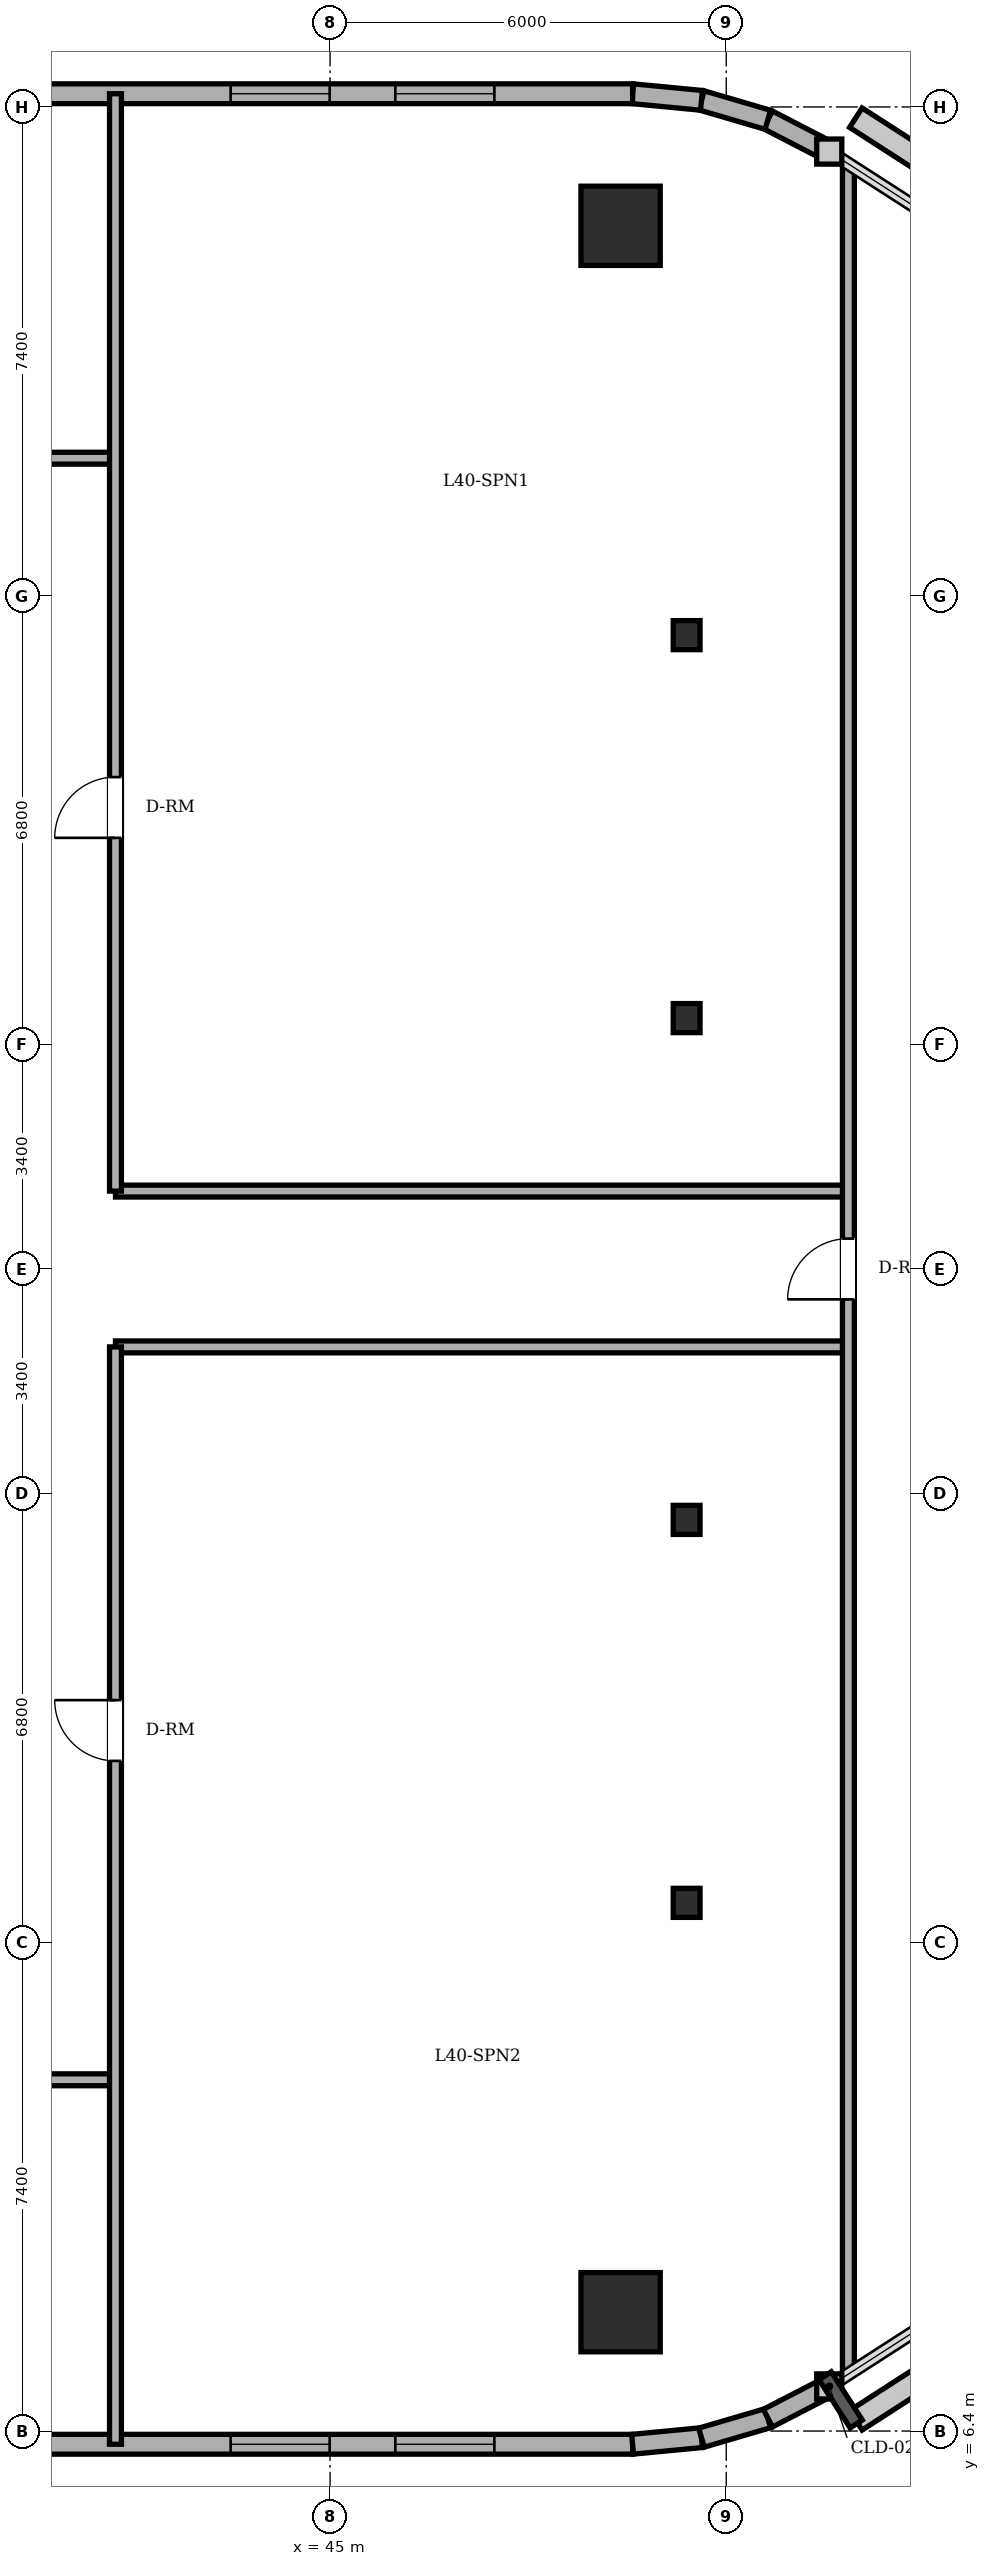
"""IFC4 building model, lengths in metres.
Left out: names, types, materials, properties, quantities, classifications, styles, units other than length and angle.
Written with IfcOpenShell. Run it as: python <this file> out.ifc"""

import sys

from ifc_helpers import new_model, si_unit, direction, frame, frame_2d, origin, origin_2d, place, context, subcontext, project, spatial, rectangle, circle, i_section, extrude, element, fill, save


model = new_model("IFC4")
c1 = context("Model", 3, precision=1e-05, world=origin(), true_north=direction((0.0, 1.0)))
c2 = subcontext(c1, "Body", "Model", "MODEL_VIEW")
j1 = project(units=[si_unit("LENGTHUNIT", "METRE"), si_unit("PLANEANGLEUNIT", "RADIAN")], contexts=[c1])
p1 = place(None, origin())
s1 = spatial("IfcSite", under=j1, at=p1, CompositionType="ELEMENT")
p2 = place(p1, origin())
s2 = spatial("IfcBuilding", under=s1, at=p2, CompositionType="ELEMENT")
p3 = place(p2, frame((0.0, 0.0, 154.6)))
s3 = spatial("IfcBuildingStorey", under=s2, at=p3, CompositionType="ELEMENT", Elevation=154.6)
for number, where, z_axis, x_axis in (
    (1, (49.4, 8.2, 0.0), (0.0, 0.0, 1.0), (1.0, 0.0, 0.0)),
    (2, (49.4, 39.8, 0.0), (0.0, 0.0, 1.0), (1.0, 0.0, 0.0)),
):
    element("IfcColumn", number, at=place(p3, frame(where, z_axis=z_axis, x_axis=x_axis)), inside=s3, PredefinedType="COLUMN", context=c2, shape_type="SweptSolid", body=[
        extrude(circle(Radius=0.6, at=origin_2d()), origin(), (0.0, 0.0, 1.0), 3.6),
    ])
for number, where, z_axis, x_axis in (
    (3, (50.4, 14.4, 0.0), (0.0, 0.0, 1.0), (1.0, 0.0, 0.0)),
    (4, (50.4, 20.2, 0.0), (0.0, 0.0, 1.0), (1.0, 0.0, 0.0)),
    (5, (50.4, 27.8, 0.0), (0.0, 0.0, 1.0), (1.0, 0.0, 0.0)),
    (6, (50.4, 33.6, 0.0), (0.0, 0.0, 1.0), (1.0, 0.0, 0.0)),
):
    element("IfcColumn", number, at=place(p3, frame(where, z_axis=z_axis, x_axis=x_axis)), inside=s3, PredefinedType="COLUMN", context=c2, shape_type="SweptSolid", body=[
        extrude(i_section(OverallWidth=0.406, OverallDepth=0.44, WebThickness=0.024, FlangeThickness=0.039, FilletRadius=0.015, at=origin_2d()), origin(), (0.0, 0.0, 1.0), 3.6),
    ])
p4 = place(p3, frame((19.3, 6.2, 0.0), z_axis=(0.0, 0.0, 1.0), x_axis=(1.0, 0.0, 0.0)))
e7 = element("IfcWall", 7, at=p4, inside=s3, PredefinedType="SOLIDWALL", context=c2, shape_type="SweptSolid", body=[
    extrude(rectangle(XDim=30.282, YDim=0.3, at=frame_2d((15.141, 0.0))), origin(), (0.0, 0.0, 1.0), 3.4),
])
p5 = place(p4, frame((5.825, 0.0, 0.0)))
e8 = element("IfcOpeningElement", 8, at=p5, cuts=e7, PredefinedType="OPENING", context=c2, shape_type="SweptSolid", body=[
    extrude(rectangle(XDim=0.95, YDim=2.2, at=frame_2d((0.475, 1.1))), frame((0.0, 0.16, 0.0), z_axis=(0.0, -1.0, 0.0), x_axis=(1.0, 0.0, 0.0)), (0.0, 0.0, 1.0), 0.32),
])
p6 = place(p4, frame((1.25, 0.0, 0.85)))
e9 = element("IfcOpeningElement", 9, at=p6, cuts=e7, PredefinedType="OPENING", context=c2, shape_type="SweptSolid", body=[
    extrude(rectangle(XDim=1.5, YDim=1.55, at=frame_2d((0.75, 0.775))), frame((0.0, 0.16, 0.0), z_axis=(0.0, -1.0, 0.0), x_axis=(1.0, 0.0, 0.0)), (0.0, 0.0, 1.0), 0.32),
])
p7 = place(p4, frame((2.9, 0.0, 0.85)))
e10 = element("IfcOpeningElement", 10, at=p7, cuts=e7, PredefinedType="OPENING", context=c2, shape_type="SweptSolid", body=[
    extrude(rectangle(XDim=1.5, YDim=1.55, at=frame_2d((0.75, 0.775))), frame((0.0, 0.16, 0.0), z_axis=(0.0, -1.0, 0.0), x_axis=(1.0, 0.0, 0.0)), (0.0, 0.0, 1.0), 0.32),
])
p8 = place(p4, frame((12.8, 0.0, 0.85)))
e11 = element("IfcOpeningElement", 11, at=p8, cuts=e7, PredefinedType="OPENING", context=c2, shape_type="SweptSolid", body=[
    extrude(rectangle(XDim=1.5, YDim=1.55, at=frame_2d((0.75, 0.775))), frame((0.0, 0.16, 0.0), z_axis=(0.0, -1.0, 0.0), x_axis=(1.0, 0.0, 0.0)), (0.0, 0.0, 1.0), 0.32),
])
p9 = place(p4, frame((17.25, 0.0, 0.85)))
e12 = element("IfcOpeningElement", 12, at=p9, cuts=e7, PredefinedType="OPENING", context=c2, shape_type="SweptSolid", body=[
    extrude(rectangle(XDim=1.5, YDim=1.55, at=frame_2d((0.75, 0.775))), frame((0.0, 0.16, 0.0), z_axis=(0.0, -1.0, 0.0), x_axis=(1.0, 0.0, 0.0)), (0.0, 0.0, 1.0), 0.32),
])
p10 = place(p4, frame((24.194, 0.0, 0.85)))
e13 = element("IfcOpeningElement", 13, at=p10, cuts=e7, PredefinedType="OPENING", context=c2, shape_type="SweptSolid", body=[
    extrude(rectangle(XDim=1.5, YDim=1.55, at=frame_2d((0.75, 0.775))), frame((0.0, 0.16, 0.0), z_axis=(0.0, -1.0, 0.0), x_axis=(1.0, 0.0, 0.0)), (0.0, 0.0, 1.0), 0.32),
])
p11 = place(p4, frame((26.688, 0.0, 0.85)))
e14 = element("IfcOpeningElement", 14, at=p11, cuts=e7, PredefinedType="OPENING", context=c2, shape_type="SweptSolid", body=[
    extrude(rectangle(XDim=1.5, YDim=1.55, at=frame_2d((0.75, 0.775))), frame((0.0, 0.16, 0.0), z_axis=(0.0, -1.0, 0.0), x_axis=(1.0, 0.0, 0.0)), (0.0, 0.0, 1.0), 0.32),
])
p12 = place(p3, frame((49.582, 6.2, 0.0), z_axis=(0.0, 0.0, 1.0), x_axis=(0.995426089968, 0.095534807324, 0.0)))
e15 = element("IfcWall", 15, at=p12, inside=s3, PredefinedType="SOLIDWALL", context=c2, shape_type="SweptSolid", body=[
    extrude(rectangle(XDim=1.048, YDim=0.3, at=frame_2d((0.524, 0.0))), origin(), (0.0, 0.0, 1.0), 3.4),
])
p13 = place(p3, frame((50.625, 6.3, 0.0), z_axis=(0.0, 0.0, 1.0), x_axis=(0.959528674476, 0.281610942363, 0.0)))
e16 = element("IfcWall", 16, at=p13, inside=s3, PredefinedType="SOLIDWALL", context=c2, shape_type="SweptSolid", body=[
    extrude(rectangle(XDim=1.047, YDim=0.3, at=frame_2d((0.524, 0.0))), origin(), (0.0, 0.0, 1.0), 3.4),
])
for number, where, z_axis, x_axis in (
    (17, (51.63, 6.595, 0.0), (0.0, 0.0, 1.0), (0.888, 0.459, 0.0)),
    (18, (52.56, 40.924, 0.0), (0.0, 0.0, 1.0), (-0.888, 0.459, 0.0)),
):
    element("IfcWall", number, at=place(p3, frame(where, z_axis=z_axis, x_axis=x_axis)), inside=s3, PredefinedType="SOLIDWALL", context=c2, shape_type="SweptSolid", body=[
        extrude(rectangle(XDim=1.047, YDim=0.3, at=frame_2d((0.523, 0.0))), origin(), (0.0, 0.0, 1.0), 3.4),
    ])
p14 = place(p3, frame((51.63, 41.405, 0.0), z_axis=(0.0, 0.0, 1.0), x_axis=(-0.959528674476, 0.281610942363, 0.0)))
e19 = element("IfcWall", 19, at=p14, inside=s3, PredefinedType="SOLIDWALL", context=c2, shape_type="SweptSolid", body=[
    extrude(rectangle(XDim=1.047, YDim=0.3, at=frame_2d((0.524, 0.0))), origin(), (0.0, 0.0, 1.0), 3.4),
])
p15 = place(p3, frame((50.625, 41.7, 0.0), z_axis=(0.0, 0.0, 1.0), x_axis=(-0.995426089968, 0.095534807324, 0.0)))
e20 = element("IfcWall", 20, at=p15, inside=s3, PredefinedType="SOLIDWALL", context=c2, shape_type="SweptSolid", body=[
    extrude(rectangle(XDim=1.048, YDim=0.3, at=frame_2d((0.524, 0.0))), origin(), (0.0, 0.0, 1.0), 3.4),
])
p16 = place(p3, frame((49.582, 41.8, 0.0), z_axis=(0.0, 0.0, 1.0), x_axis=(-1.0, 0.0, 0.0)))
e21 = element("IfcWall", 21, at=p16, inside=s3, PredefinedType="SOLIDWALL", context=c2, shape_type="SweptSolid", body=[
    extrude(rectangle(XDim=30.282, YDim=0.3, at=frame_2d((15.141, 0.0))), origin(), (0.0, 0.0, 1.0), 3.4),
])
p17 = place(p16, frame((13.907, 0.0, 0.0)))
e22 = element("IfcOpeningElement", 22, at=p17, cuts=e21, PredefinedType="OPENING", context=c2, shape_type="SweptSolid", body=[
    extrude(rectangle(XDim=0.95, YDim=2.2, at=frame_2d((0.475, 1.1))), frame((0.0, 0.16, 0.0), z_axis=(0.0, -1.0, 0.0), x_axis=(1.0, 0.0, 0.0)), (0.0, 0.0, 1.0), 0.32),
])
p18 = place(p16, frame((2.094, 0.0, 0.85)))
e23 = element("IfcOpeningElement", 23, at=p18, cuts=e21, PredefinedType="OPENING", context=c2, shape_type="SweptSolid", body=[
    extrude(rectangle(XDim=1.5, YDim=1.55, at=frame_2d((0.75, 0.775))), frame((0.0, 0.16, 0.0), z_axis=(0.0, -1.0, 0.0), x_axis=(1.0, 0.0, 0.0)), (0.0, 0.0, 1.0), 0.32),
])
p19 = place(p16, frame((4.588, 0.0, 0.85)))
e24 = element("IfcOpeningElement", 24, at=p19, cuts=e21, PredefinedType="OPENING", context=c2, shape_type="SweptSolid", body=[
    extrude(rectangle(XDim=1.5, YDim=1.55, at=frame_2d((0.75, 0.775))), frame((0.0, 0.16, 0.0), z_axis=(0.0, -1.0, 0.0), x_axis=(1.0, 0.0, 0.0)), (0.0, 0.0, 1.0), 0.32),
])
p20 = place(p16, frame((10.399, 0.0, 0.85)))
e25 = element("IfcOpeningElement", 25, at=p20, cuts=e21, PredefinedType="OPENING", context=c2, shape_type="SweptSolid", body=[
    extrude(rectangle(XDim=1.5, YDim=1.55, at=frame_2d((0.75, 0.775))), frame((0.0, 0.16, 0.0), z_axis=(0.0, -1.0, 0.0), x_axis=(1.0, 0.0, 0.0)), (0.0, 0.0, 1.0), 0.32),
])
p21 = place(p16, frame((18.932, 0.0, 0.85)))
e26 = element("IfcOpeningElement", 26, at=p21, cuts=e21, PredefinedType="OPENING", context=c2, shape_type="SweptSolid", body=[
    extrude(rectangle(XDim=1.5, YDim=1.55, at=frame_2d((0.75, 0.775))), frame((0.0, 0.16, 0.0), z_axis=(0.0, -1.0, 0.0), x_axis=(1.0, 0.0, 0.0)), (0.0, 0.0, 1.0), 0.32),
])
p22 = place(p16, frame((22.532, 0.0, 0.85)))
e27 = element("IfcOpeningElement", 27, at=p22, cuts=e21, PredefinedType="OPENING", context=c2, shape_type="SweptSolid", body=[
    extrude(rectangle(XDim=1.5, YDim=1.55, at=frame_2d((0.75, 0.775))), frame((0.0, 0.16, 0.0), z_axis=(0.0, -1.0, 0.0), x_axis=(1.0, 0.0, 0.0)), (0.0, 0.0, 1.0), 0.32),
])
p23 = place(p16, frame((25.882, 0.0, 0.85)))
e28 = element("IfcOpeningElement", 28, at=p23, cuts=e21, PredefinedType="OPENING", context=c2, shape_type="SweptSolid", body=[
    extrude(rectangle(XDim=1.5, YDim=1.55, at=frame_2d((0.75, 0.775))), frame((0.0, 0.16, 0.0), z_axis=(0.0, -1.0, 0.0), x_axis=(1.0, 0.0, 0.0)), (0.0, 0.0, 1.0), 0.32),
])
p24 = place(p16, frame((27.532, 0.0, 0.85)))
e29 = element("IfcOpeningElement", 29, at=p24, cuts=e21, PredefinedType="OPENING", context=c2, shape_type="SweptSolid", body=[
    extrude(rectangle(XDim=1.5, YDim=1.55, at=frame_2d((0.75, 0.775))), frame((0.0, 0.16, 0.0), z_axis=(0.0, -1.0, 0.0), x_axis=(1.0, 0.0, 0.0)), (0.0, 0.0, 1.0), 0.32),
])
p25 = place(p3, frame((13.8, 11.72, 0.0), z_axis=(0.0, 0.0, 1.0), x_axis=(1.0, 0.0, 0.0)))
e30 = element("IfcWall", 30, at=p25, inside=s3, PredefinedType="PARTITIONING", context=c2, shape_type="SweptSolid", body=[
    extrude(rectangle(XDim=27.95, YDim=0.18, at=frame_2d((13.975, 0.0))), origin(), (0.0, 0.0, 1.0), 3.4),
])
p26 = place(p25, frame((12.24, 0.0, 0.0)))
e31 = element("IfcOpeningElement", 31, at=p26, cuts=e30, PredefinedType="OPENING", context=c2, shape_type="SweptSolid", body=[
    extrude(rectangle(XDim=0.92, YDim=2.1, at=frame_2d((0.46, 1.05))), frame((0.0, 0.1, 0.0), z_axis=(0.0, -1.0, 0.0), x_axis=(1.0, 0.0, 0.0)), (0.0, 0.0, 1.0), 0.2),
])
p27 = place(p25, frame((5.54, 0.0, 0.0)))
e32 = element("IfcOpeningElement", 32, at=p27, cuts=e30, PredefinedType="OPENING", context=c2, shape_type="SweptSolid", body=[
    extrude(rectangle(XDim=0.92, YDim=2.1, at=frame_2d((0.46, 1.05))), frame((0.0, 0.1, 0.0), z_axis=(0.0, -1.0, 0.0), x_axis=(1.0, 0.0, 0.0)), (0.0, 0.0, 1.0), 0.2),
])
p28 = place(p25, frame((20.555, 0.0, 0.0)))
e33 = element("IfcOpeningElement", 33, at=p28, cuts=e30, PredefinedType="OPENING", context=c2, shape_type="SweptSolid", body=[
    extrude(rectangle(XDim=0.92, YDim=2.1, at=frame_2d((0.46, 1.05))), frame((0.0, 0.1, 0.0), z_axis=(0.0, -1.0, 0.0), x_axis=(1.0, 0.0, 0.0)), (0.0, 0.0, 1.0), 0.2),
])
for number, where, z_axis, x_axis in (
    (34, (41.75, 22.82, 0.0), (0.0, 0.0, 1.0), (1.0, 0.0, 0.0)),
    (35, (41.75, 25.18, 0.0), (0.0, 0.0, 1.0), (1.0, 0.0, 0.0)),
):
    element("IfcWall", number, at=place(p3, frame(where, z_axis=z_axis, x_axis=x_axis)), inside=s3, PredefinedType="PARTITIONING", context=c2, shape_type="SweptSolid", body=[
        extrude(rectangle(XDim=11.1, YDim=0.18, at=frame_2d((5.55, 0.0))), origin(), (0.0, 0.0, 1.0), 3.4),
    ])
p29 = place(p3, frame((13.8, 36.28, 0.0), z_axis=(0.0, 0.0, 1.0), x_axis=(1.0, 0.0, 0.0)))
e36 = element("IfcWall", 36, at=p29, inside=s3, PredefinedType="PARTITIONING", context=c2, shape_type="SweptSolid", body=[
    extrude(rectangle(XDim=27.95, YDim=0.18, at=frame_2d((13.975, 0.0))), origin(), (0.0, 0.0, 1.0), 3.4),
])
p30 = place(p29, frame((12.05, 0.0, 0.0)))
e37 = element("IfcOpeningElement", 37, at=p30, cuts=e36, PredefinedType="OPENING", context=c2, shape_type="SweptSolid", body=[
    extrude(rectangle(XDim=0.9, YDim=2.1, at=frame_2d((0.45, 1.05))), frame((0.0, 0.1, 0.0), z_axis=(0.0, -1.0, 0.0), x_axis=(1.0, 0.0, 0.0)), (0.0, 0.0, 1.0), 0.2),
])
p31 = place(p29, frame((15.67, 0.0, 0.0)))
e38 = element("IfcOpeningElement", 38, at=p31, cuts=e36, PredefinedType="OPENING", context=c2, shape_type="SweptSolid", body=[
    extrude(rectangle(XDim=0.86, YDim=2.1, at=frame_2d((0.43, 1.05))), frame((0.0, 0.1, 0.0), z_axis=(0.0, -1.0, 0.0), x_axis=(1.0, 0.0, 0.0)), (0.0, 0.0, 1.0), 0.2),
])
p32 = place(p29, frame((5.54, 0.0, 0.0)))
e39 = element("IfcOpeningElement", 39, at=p32, cuts=e36, PredefinedType="OPENING", context=c2, shape_type="SweptSolid", body=[
    extrude(rectangle(XDim=0.92, YDim=2.1, at=frame_2d((0.46, 1.05))), frame((0.0, 0.1, 0.0), z_axis=(0.0, -1.0, 0.0), x_axis=(1.0, 0.0, 0.0)), (0.0, 0.0, 1.0), 0.2),
])
p33 = place(p29, frame((22.215, 0.0, 0.0)))
e40 = element("IfcOpeningElement", 40, at=p33, cuts=e36, PredefinedType="OPENING", context=c2, shape_type="SweptSolid", body=[
    extrude(rectangle(XDim=1.0, YDim=2.15, at=frame_2d((0.5, 1.075))), frame((0.0, 0.1, 0.0), z_axis=(0.0, -1.0, 0.0), x_axis=(1.0, 0.0, 0.0)), (0.0, 0.0, 1.0), 0.2),
])
p34 = place(p3, frame((41.75, 6.2, 0.0), z_axis=(0.0, 0.0, 1.0), x_axis=(0.0, 1.0, 0.0)))
e41 = element("IfcWall", 41, at=p34, inside=s3, PredefinedType="PARTITIONING", context=c2, shape_type="SweptSolid", body=[
    extrude(rectangle(XDim=16.62, YDim=0.18, at=frame_2d((8.31, 0.0))), origin(), (0.0, 0.0, 1.0), 3.4),
])
p35 = place(p34, frame((10.35, 0.0, 0.0)))
e42 = element("IfcOpeningElement", 42, at=p35, cuts=e41, PredefinedType="OPENING", context=c2, shape_type="SweptSolid", body=[
    extrude(rectangle(XDim=0.92, YDim=2.1, at=frame_2d((0.46, 1.05))), frame((0.0, 0.1, 0.0), z_axis=(0.0, -1.0, 0.0), x_axis=(1.0, 0.0, 0.0)), (0.0, 0.0, 1.0), 0.2),
])
p36 = place(p3, frame((41.75, 25.18, 0.0), z_axis=(0.0, 0.0, 1.0), x_axis=(0.0, 1.0, 0.0)))
e43 = element("IfcWall", 43, at=p36, inside=s3, PredefinedType="PARTITIONING", context=c2, shape_type="SweptSolid", body=[
    extrude(rectangle(XDim=16.62, YDim=0.18, at=frame_2d((8.31, 0.0))), origin(), (0.0, 0.0, 1.0), 3.4),
])
p37 = place(p36, frame((5.35, 0.0, 0.0)))
e44 = element("IfcOpeningElement", 44, at=p37, cuts=e43, PredefinedType="OPENING", context=c2, shape_type="SweptSolid", body=[
    extrude(rectangle(XDim=0.92, YDim=2.1, at=frame_2d((0.46, 1.05))), frame((0.0, 0.1, 0.0), z_axis=(0.0, -1.0, 0.0), x_axis=(1.0, 0.0, 0.0)), (0.0, 0.0, 1.0), 0.2),
])
p38 = place(p3, frame((52.85, 7.263, 0.0), z_axis=(0.0, 0.0, 1.0), x_axis=(0.0, 1.0, 0.0)))
e45 = element("IfcWall", 45, at=p38, inside=s3, PredefinedType="PARTITIONING", context=c2, shape_type="SweptSolid", body=[
    extrude(rectangle(XDim=33.474, YDim=0.18, at=frame_2d((16.737, 0.0))), origin(), (0.0, 0.0, 1.0), 3.4),
])
p39 = place(p38, frame((16.277, 0.0, 0.0)))
e46 = element("IfcOpeningElement", 46, at=p39, cuts=e45, PredefinedType="OPENING", context=c2, shape_type="SweptSolid", body=[
    extrude(rectangle(XDim=0.92, YDim=2.1, at=frame_2d((0.46, 1.05))), frame((0.0, 0.1, 0.0), z_axis=(0.0, -1.0, 0.0), x_axis=(1.0, 0.0, 0.0)), (0.0, 0.0, 1.0), 0.2),
])
p40 = place(p10, origin())
e47 = element("IfcWindow", 47, at=p40, inside=s3, PartitioningType="DOUBLE_PANEL_VERTICAL", PredefinedType="WINDOW", context=c2, shape_type="SweptSolid", body=[
    extrude(rectangle(XDim=1.5, YDim=1.55, at=frame_2d((0.75, 0.775))), frame((0.0, 0.03, 0.0), z_axis=(0.0, -1.0, 0.0), x_axis=(1.0, 0.0, 0.0)), (0.0, 0.0, 1.0), 0.06),
])
fill(e13, e47)
p41 = place(p11, origin())
e48 = element("IfcWindow", 48, at=p41, inside=s3, PartitioningType="DOUBLE_PANEL_VERTICAL", PredefinedType="WINDOW", context=c2, shape_type="SweptSolid", body=[
    extrude(rectangle(XDim=1.5, YDim=1.55, at=frame_2d((0.75, 0.775))), frame((0.0, 0.03, 0.0), z_axis=(0.0, -1.0, 0.0), x_axis=(1.0, 0.0, 0.0)), (0.0, 0.0, 1.0), 0.06),
])
fill(e14, e48)
p42 = place(p18, origin())
e49 = element("IfcWindow", 49, at=p42, inside=s3, PartitioningType="DOUBLE_PANEL_VERTICAL", PredefinedType="WINDOW", context=c2, shape_type="SweptSolid", body=[
    extrude(rectangle(XDim=1.5, YDim=1.55, at=frame_2d((0.75, 0.775))), frame((0.0, 0.03, 0.0), z_axis=(0.0, -1.0, 0.0), x_axis=(1.0, 0.0, 0.0)), (0.0, 0.0, 1.0), 0.06),
])
fill(e23, e49)
p43 = place(p19, origin())
e50 = element("IfcWindow", 50, at=p43, inside=s3, PartitioningType="DOUBLE_PANEL_VERTICAL", PredefinedType="WINDOW", context=c2, shape_type="SweptSolid", body=[
    extrude(rectangle(XDim=1.5, YDim=1.55, at=frame_2d((0.75, 0.775))), frame((0.0, 0.03, 0.0), z_axis=(0.0, -1.0, 0.0), x_axis=(1.0, 0.0, 0.0)), (0.0, 0.0, 1.0), 0.06),
])
fill(e24, e50)
p44 = place(p37, origin())
e51 = element("IfcDoor", 51, at=p44, inside=s3, OperationType="SINGLE_SWING_LEFT", PredefinedType="DOOR", context=c2, shape_type="SweptSolid", body=[
    extrude(rectangle(XDim=0.92, YDim=2.1, at=frame_2d((0.46, 1.05))), frame((0.0, 0.025, 0.0), z_axis=(0.0, -1.0, 0.0), x_axis=(1.0, 0.0, 0.0)), (0.0, 0.0, 1.0), 0.05),
])
fill(e44, e51)
p45 = place(p35, origin())
e52 = element("IfcDoor", 52, at=p45, inside=s3, OperationType="SINGLE_SWING_RIGHT", PredefinedType="DOOR", context=c2, shape_type="SweptSolid", body=[
    extrude(rectangle(XDim=0.92, YDim=2.1, at=frame_2d((0.46, 1.05))), frame((0.0, 0.025, 0.0), z_axis=(0.0, -1.0, 0.0), x_axis=(1.0, 0.0, 0.0)), (0.0, 0.0, 1.0), 0.05),
])
fill(e42, e52)
p46 = place(p39, origin())
e53 = element("IfcDoor", 53, at=p46, inside=s3, OperationType="SINGLE_SWING_LEFT", PredefinedType="DOOR", context=c2, shape_type="SweptSolid", body=[
    extrude(rectangle(XDim=0.92, YDim=2.1, at=frame_2d((0.46, 1.05))), frame((0.0, 0.025, 0.0), z_axis=(0.0, -1.0, 0.0), x_axis=(1.0, 0.0, 0.0)), (0.0, 0.0, 1.0), 0.05),
])
fill(e46, e53)
save(model, sys.argv[1])
